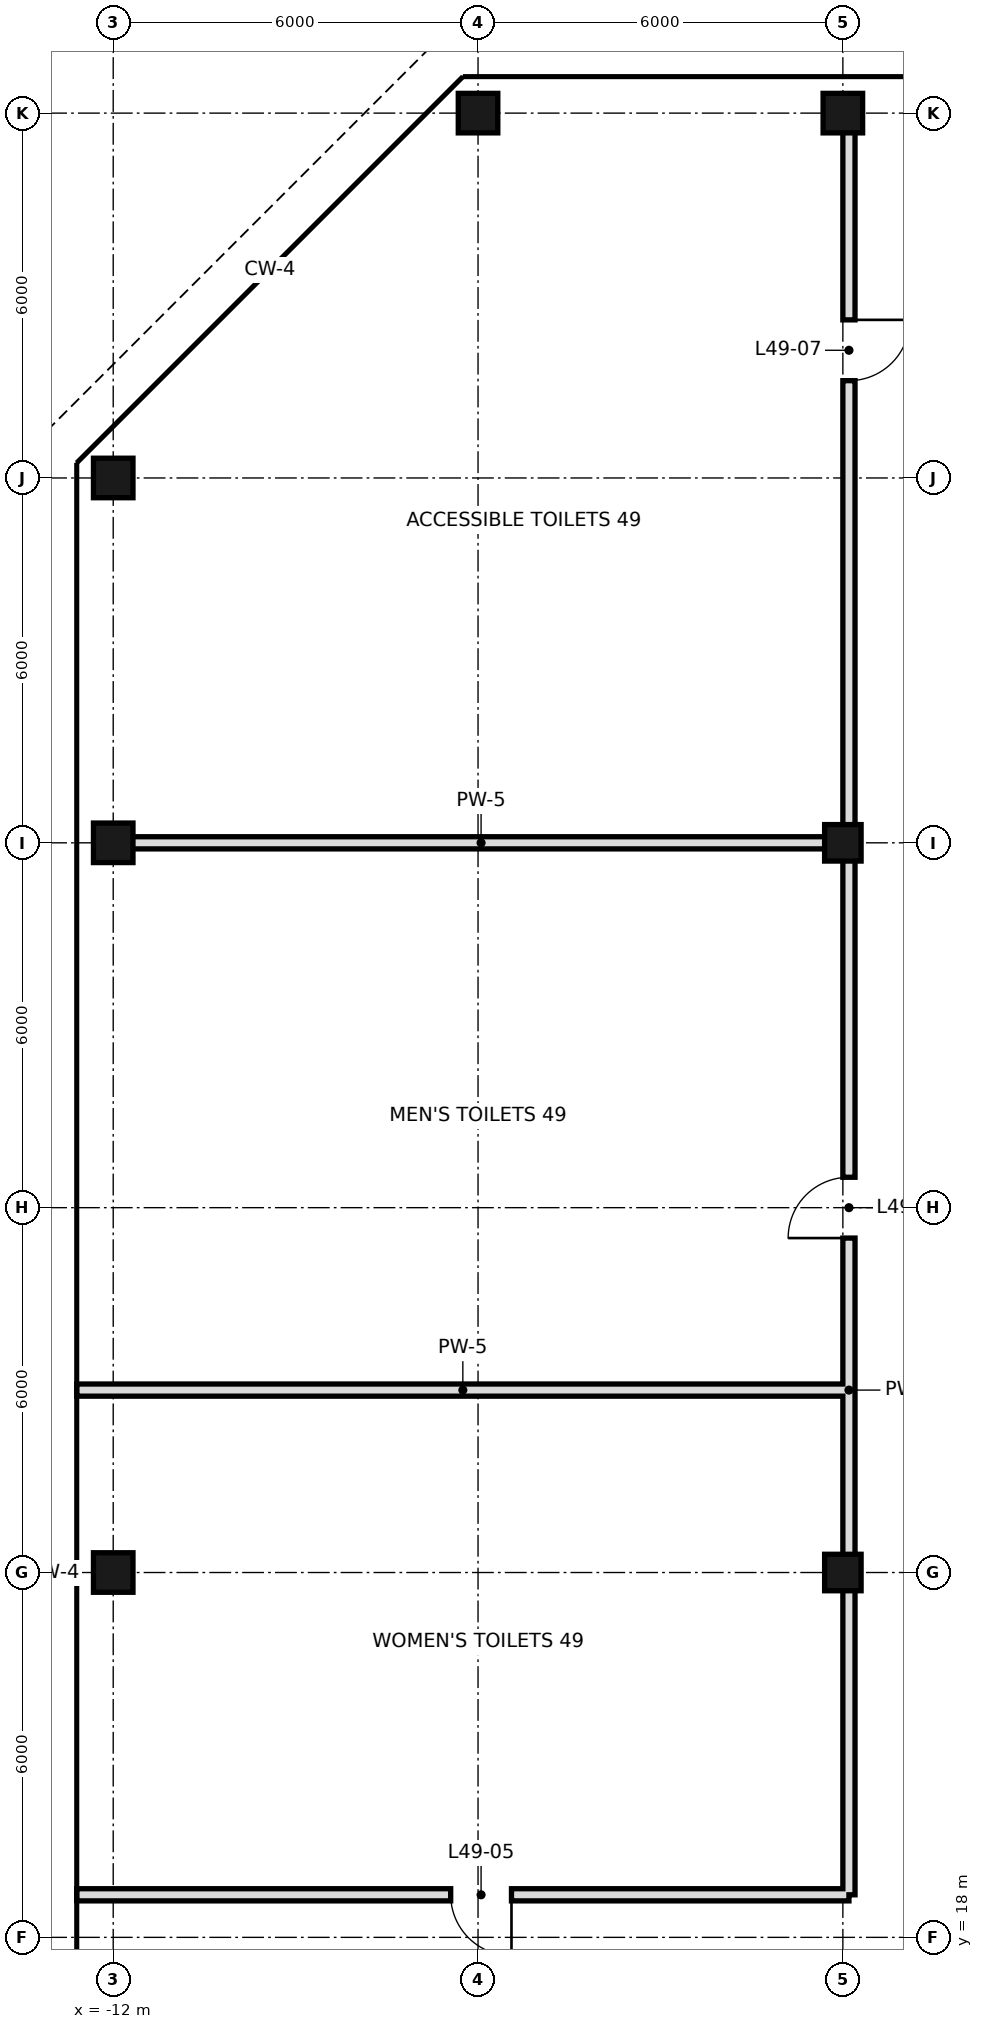
"""IFC4 building model, lengths in metres.
Left out: names, types, materials, properties, quantities, classifications, styles, units other than length and angle.
Written with IfcOpenShell. Run it as: python <this file> out.ifc"""

import sys

from ifc_helpers import new_model, si_unit, direction, frame, frame_2d, origin, origin_2d, place, context, subcontext, project, spatial, rectangle, hollow_rectangle, extrude, element, fill, save


model = new_model("IFC4")
c1 = context("Model", 3, precision=1e-05, world=origin(), true_north=direction((0.0, 1.0)))
c2 = subcontext(c1, "Body", "Model", "MODEL_VIEW")
j1 = project(units=[si_unit("LENGTHUNIT", "METRE"), si_unit("PLANEANGLEUNIT", "RADIAN")], contexts=[c1])
p1 = place(None, origin())
s1 = spatial("IfcSite", under=j1, at=p1, CompositionType="ELEMENT")
p2 = place(p1, origin())
s2 = spatial("IfcBuilding", under=s1, at=p2, CompositionType="ELEMENT")
p3 = place(p2, frame((0.0, 0.0, 210.0)))
s3 = spatial("IfcBuildingStorey", under=s2, at=p3, CompositionType="ELEMENT", Elevation=210.0)
for number, where, z_axis, x_axis in (
    (1, (-12.0, 24.0, 0.0), (0.0, 0.0, 1.0), (1.0, 0.0, 0.0)),
    (2, (-12.0, 36.0, 0.0), (0.0, 0.0, 1.0), (1.0, 0.0, 0.0)),
    (3, (-12.0, 42.0, 0.0), (0.0, 0.0, 1.0), (1.0, 0.0, 0.0)),
    (4, (-6.0, 48.0, 0.0), (0.0, 0.0, 1.0), (1.0, 0.0, 0.0)),
):
    element("IfcColumn", number, at=place(p3, frame(where, z_axis=z_axis, x_axis=x_axis)), inside=s3, PredefinedType="COLUMN", context=c2, shape_type="SweptSolid", body=[
        extrude(hollow_rectangle(XDim=0.65, YDim=0.65, WallThickness=0.032, at=origin_2d()), origin(), (0.0, 0.0, 1.0), 5.4),
    ])
for number, where, z_axis, x_axis in (
    (5, (0.0, 24.0, 0.0), (0.0, 0.0, 1.0), (1.0, 0.0, 0.0)),
    (6, (0.0, 36.0, 0.0), (0.0, 0.0, 1.0), (1.0, 0.0, 0.0)),
):
    element("IfcColumn", number, at=place(p3, frame(where, z_axis=z_axis, x_axis=x_axis)), inside=s3, PredefinedType="COLUMN", context=c2, shape_type="SweptSolid", body=[
        extrude(hollow_rectangle(XDim=0.6, YDim=0.6, WallThickness=0.028, at=origin_2d()), origin(), (0.0, 0.0, 1.0), 5.4),
    ])
p4 = place(p3, frame((0.0, 48.0, 0.0), z_axis=(0.0, 0.0, 1.0), x_axis=(1.0, 0.0, 0.0)))
e7 = element("IfcColumn", 7, at=p4, inside=s3, PredefinedType="COLUMN", context=c2, shape_type="SweptSolid", body=[
    extrude(hollow_rectangle(XDim=0.65, YDim=0.65, WallThickness=0.032, at=origin_2d()), origin(), (0.0, 0.0, 1.0), 5.4),
])
p5 = place(p3, frame((0.1, 18.7, 0.0), z_axis=(0.0, 0.0, 1.0), x_axis=(0.0, 1.0, 0.0)))
e8 = element("IfcWall", 8, at=p5, inside=s3, PredefinedType="SOLIDWALL", context=c2, shape_type="SweptSolid", body=[
    extrude(rectangle(XDim=29.3, YDim=0.2, at=frame_2d((14.65, 0.0))), origin(), (0.0, 0.0, 1.0), 4.52),
])
p6 = place(p5, frame((10.8, 0.0, 0.0)))
e9 = element("IfcOpeningElement", 9, at=p6, cuts=e8, PredefinedType="OPENING", context=c2, shape_type="SweptSolid", body=[
    extrude(rectangle(XDim=1.0, YDim=2.4, at=frame_2d((0.5, 1.2))), frame((0.0, 0.11, 0.0), z_axis=(0.0, -1.0, 0.0), x_axis=(1.0, 0.0, 0.0)), (0.0, 0.0, 1.0), 0.22),
])
p7 = place(p5, frame((24.9, 0.0, 0.0)))
e10 = element("IfcOpeningElement", 10, at=p7, cuts=e8, PredefinedType="OPENING", context=c2, shape_type="SweptSolid", body=[
    extrude(rectangle(XDim=1.0, YDim=2.4, at=frame_2d((0.5, 1.2))), frame((0.0, 0.11, 0.0), z_axis=(0.0, -1.0, 0.0), x_axis=(1.0, 0.0, 0.0)), (0.0, 0.0, 1.0), 0.22),
])
p8 = place(p3, frame((-12.6, 18.7, 0.0), z_axis=(0.0, 0.0, 1.0), x_axis=(1.0, 0.0, 0.0)))
e11 = element("IfcWall", 11, at=p8, inside=s3, PredefinedType="SOLIDWALL", context=c2, shape_type="SweptSolid", body=[
    extrude(rectangle(XDim=12.7, YDim=0.2, at=frame_2d((6.35, 0.0))), origin(), (0.0, 0.0, 1.0), 4.52),
])
p9 = place(p8, frame((6.15, 0.0, 0.0)))
e12 = element("IfcOpeningElement", 12, at=p9, cuts=e11, PredefinedType="OPENING", context=c2, shape_type="SweptSolid", body=[
    extrude(rectangle(XDim=1.0, YDim=2.4, at=frame_2d((0.5, 1.2))), frame((0.0, 0.11, 0.0), z_axis=(0.0, -1.0, 0.0), x_axis=(1.0, 0.0, 0.0)), (0.0, 0.0, 1.0), 0.22),
])
p10 = place(p3, frame((-12.6, 27.0, 0.0), z_axis=(0.0, 0.0, 1.0), x_axis=(1.0, 0.0, 0.0)))
e13 = element("IfcWall", 13, at=p10, inside=s3, PredefinedType="SOLIDWALL", context=c2, shape_type="SweptSolid", body=[
    extrude(rectangle(XDim=12.7, YDim=0.2, at=frame_2d((6.35, 0.0))), origin(), (0.0, 0.0, 1.0), 4.52),
])
p11 = place(p3, frame((-12.0, 36.0, 0.0), z_axis=(0.0, 0.0, 1.0), x_axis=(1.0, 0.0, 0.0)))
e14 = element("IfcWall", 14, at=p11, inside=s3, PredefinedType="SOLIDWALL", context=c2, shape_type="SweptSolid", body=[
    extrude(rectangle(XDim=12.1, YDim=0.2, at=frame_2d((6.05, 0.0))), origin(), (0.0, 0.0, 1.0), 4.52),
])
p12 = place(p9, origin())
e15 = element("IfcDoor", 15, at=p12, inside=s3, OperationType="SINGLE_SWING_RIGHT", PredefinedType="DOOR", context=c2, shape_type="SweptSolid", body=[
    extrude(rectangle(XDim=1.0, YDim=2.4, at=frame_2d((0.5, 1.2))), frame((0.0, 0.025, 0.0), z_axis=(0.0, -1.0, 0.0), x_axis=(1.0, 0.0, 0.0)), (0.0, 0.0, 1.0), 0.05),
])
fill(e12, e15)
p13 = place(p6, origin())
e16 = element("IfcDoor", 16, at=p13, inside=s3, OperationType="SINGLE_SWING_LEFT", PredefinedType="DOOR", context=c2, shape_type="SweptSolid", body=[
    extrude(rectangle(XDim=1.0, YDim=2.4, at=frame_2d((0.5, 1.2))), frame((0.0, 0.025, 0.0), z_axis=(0.0, -1.0, 0.0), x_axis=(1.0, 0.0, 0.0)), (0.0, 0.0, 1.0), 0.05),
])
fill(e9, e16)
p14 = place(p7, origin())
e17 = element("IfcDoor", 17, at=p14, inside=s3, OperationType="SINGLE_SWING_RIGHT", PredefinedType="DOOR", context=c2, shape_type="SweptSolid", body=[
    extrude(rectangle(XDim=1.0, YDim=2.4, at=frame_2d((0.5, 1.2))), frame((0.0, 0.025, 0.0), z_axis=(0.0, -1.0, 0.0), x_axis=(1.0, 0.0, 0.0)), (0.0, 0.0, 1.0), 0.05),
])
fill(e10, e17)
save(model, sys.argv[1])
